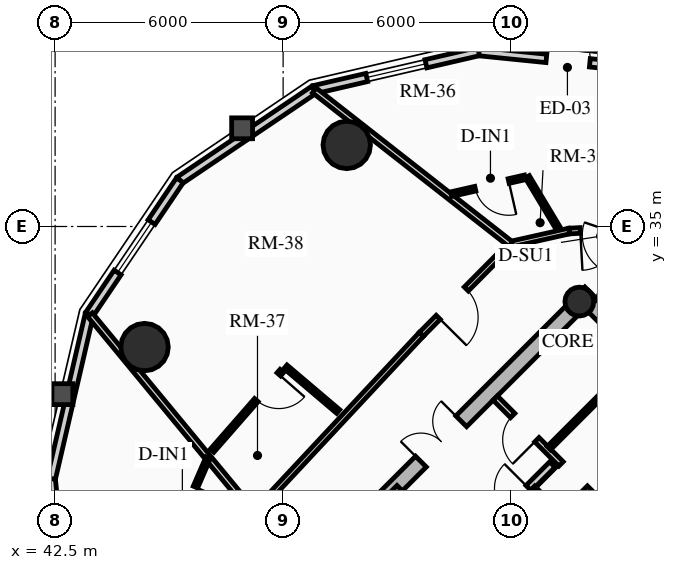
"""IFC4 building model, lengths in metres.
Left out: names, types, materials, properties, quantities, classifications, styles, units other than length and angle.
Written with IfcOpenShell. Run it as: python <this file> out.ifc"""

import sys

from ifc_helpers import new_model, si_unit, direction, frame, frame_2d, origin, origin_2d, place, context, subcontext, project, spatial, rectangle, circle, hollow_circle, extrude, source, transform, mapped, element, fill, save


model = new_model("IFC4")
c1 = context("Model", 3, precision=1e-05, world=origin(), true_north=direction((0.0, 1.0)))
c2 = subcontext(c1, "Body", "Model", "MODEL_VIEW")
j1 = project(units=[si_unit("LENGTHUNIT", "METRE"), si_unit("PLANEANGLEUNIT", "RADIAN")], contexts=[c1])
p1 = place(None, origin())
s1 = spatial("IfcSite", under=j1, at=p1, CompositionType="ELEMENT")
p2 = place(p1, origin())
s2 = spatial("IfcBuilding", under=s1, at=p2, CompositionType="ELEMENT")
p3 = place(p2, frame((0.0, 0.0, 180.7)))
s3 = spatial("IfcBuildingStorey", under=s2, at=p3, CompositionType="ELEMENT", Elevation=180.7)
p4 = place(p3, frame((66.268, 23.298, 0.0), z_axis=(0.0, 0.0, 1.0), x_axis=(-0.707106781187, 0.707106781187, 0.0)))
e1 = element("IfcWall", 1, at=p4, inside=s3, PredefinedType="SHEAR", context=c2, shape_type="SweptSolid", body=[
    extrude(rectangle(XDim=14.1, YDim=0.4, at=frame_2d((7.05, 0.0))), origin(), (0.0, 0.0, 1.0), 2.91),
])
p5 = place(p3, frame((48.873, 25.561, 0.0), z_axis=(0.0, 0.0, 1.0), x_axis=(0.707106781187, 0.707106781187, 0.0)))
e2 = element("IfcWall", 2, at=p5, inside=s3, PredefinedType="SHEAR", context=c2, shape_type="SweptSolid", body=[
    extrude(rectangle(XDim=10.7, YDim=0.4, at=frame_2d((5.35, 0.0))), origin(), (0.0, 0.0, 1.0), 2.91),
])
m1 = source(origin(), c2, "Body", "SweptSolid", [
    extrude(rectangle(XDim=1.5, YDim=2.02, at=frame_2d((0.75, 1.01))), frame((0.0, 0.21, 0.0), z_axis=(0.0, -1.0, 0.0), x_axis=(1.0, 0.0, 0.0)), (0.0, 0.0, 1.0), 0.42),
])
p6 = place(p5, frame((4.6, 0.0, 0.0)))
e3 = element("IfcOpeningElement", 3, at=p6, cuts=e2, PredefinedType="OPENING", context=c2, shape_type="MappedRepresentation", body=[
    mapped(m1, transform((0.0, 0.0, 0.0), x_axis=(1.0, 0.0, 0.0), y_axis=(0.0, 1.0, 0.0), z_axis=(0.0, 0.0, 1.0), scale=1.0)),
])
p7 = place(p3, frame((61.06, 18.373, 0.0), z_axis=(0.0, 0.0, 1.0), x_axis=(-0.707106781187, 0.707106781187, 0.0)))
e4 = element("IfcWall", 4, at=p7, inside=s3, PredefinedType="SHEAR", context=c2, shape_type="SweptSolid", body=[
    extrude(rectangle(XDim=13.7, YDim=0.35, at=frame_2d((6.85, 0.0))), origin(), (0.0, 0.0, 1.0), 2.91),
])
m2 = source(origin(), c2, "Body", "SweptSolid", [
    extrude(rectangle(XDim=1.1, YDim=2.015, at=frame_2d((0.55, 1.007))), frame((0.0, 0.185, 0.0), z_axis=(0.0, -1.0, 0.0), x_axis=(1.0, 0.0, 0.0)), (0.0, 0.0, 1.0), 0.37),
])
p8 = place(p7, frame((4.85, 0.0, 0.0)))
e5 = element("IfcOpeningElement", 5, at=p8, cuts=e4, PredefinedType="OPENING", context=c2, shape_type="MappedRepresentation", body=[
    mapped(m2, transform((0.0, 0.0, 0.0), x_axis=(1.0, 0.0, 0.0), y_axis=(0.0, 1.0, 0.0), z_axis=(0.0, 0.0, 1.0), scale=1.0)),
])
p9 = place(p7, frame((0.625, 0.0, 0.0)))
e6 = element("IfcOpeningElement", 6, at=p9, cuts=e4, PredefinedType="OPENING", context=c2, shape_type="MappedRepresentation", body=[
    mapped(m2, transform((0.0, 0.0, 0.0), x_axis=(1.0, 0.0, 0.0), y_axis=(0.0, 1.0, 0.0), z_axis=(0.0, 0.0, 1.0), scale=1.0)),
])
p10 = place(p7, frame((2.625, 0.0, 0.0)))
e7 = element("IfcOpeningElement", 7, at=p10, cuts=e4, PredefinedType="OPENING", context=c2, shape_type="MappedRepresentation", body=[
    mapped(m2, transform((0.0, 0.0, 0.0), x_axis=(1.0, 0.0, 0.0), y_axis=(0.0, 1.0, 0.0), z_axis=(0.0, 0.0, 1.0), scale=1.0)),
])
m3 = source(origin(), c2, "Body", "SweptSolid", [
    extrude(rectangle(XDim=1.15, YDim=2.02, at=frame_2d((0.575, 1.01))), frame((0.0, 0.185, 0.0), z_axis=(0.0, -1.0, 0.0), x_axis=(1.0, 0.0, 0.0)), (0.0, 0.0, 1.0), 0.37),
])
p11 = place(p7, frame((7.27, 0.0, 0.0)))
e8 = element("IfcOpeningElement", 8, at=p11, cuts=e4, PredefinedType="OPENING", context=c2, shape_type="MappedRepresentation", body=[
    mapped(m3, transform((0.0, 0.0, 0.0), x_axis=(1.0, 0.0, 0.0), y_axis=(0.0, 1.0, 0.0), z_axis=(0.0, 0.0, 1.0), scale=1.0)),
])
p12 = place(p3, frame((56.294, 33.024, 0.0), z_axis=(0.0, 0.0, 1.0), x_axis=(0.707106781187, 0.707106781187, 0.0)))
e9 = element("IfcColumn", 9, at=p12, inside=s3, PredefinedType="COLUMN", context=c2, shape_type="SweptSolid", body=[
    extrude(hollow_circle(Radius=0.38, WallThickness=0.032, at=origin_2d()), origin(), (0.0, 0.0, 1.0), 2.91),
])
for number, where, z_axis, x_axis in (
    (10, (50.173, 37.146, 0.0), (0.0, 0.0, 1.0), (1.0, 0.0, 0.0)),
    (11, (44.854, 31.827, 0.0), (0.0, 0.0, 1.0), (1.0, 0.0, 0.0)),
):
    element("IfcColumn", number, at=place(p3, frame(where, z_axis=z_axis, x_axis=x_axis)), inside=s3, PredefinedType="USERDEFINED", context=c2, shape_type="SweptSolid", body=[
        extrude(circle(Radius=0.625, at=origin_2d()), origin(), (0.0, 0.0, 1.0), 2.91),
    ])
p13 = place(p3, frame((53.645, 39.603, 0.0), z_axis=(0.0, 0.0, 1.0), x_axis=(0.994943283129, -0.100438356004, 0.0)))
e12 = element("IfcWall", 12, at=p13, inside=s3, PredefinedType="SOLIDWALL", context=c2, shape_type="SweptSolid", body=[
    extrude(rectangle(XDim=4.733, YDim=0.22, at=frame_2d((2.366, 0.0))), origin(), (0.0, 0.0, 1.0), 2.245),
])
m4 = source(origin(), c2, "Body", "SweptSolid", [
    extrude(rectangle(XDim=1.15, YDim=2.005, at=frame_2d((0.575, 1.002))), frame((0.0, 0.12, 0.0), z_axis=(0.0, -1.0, 0.0), x_axis=(1.0, 0.0, 0.0)), (0.0, 0.0, 1.0), 0.24),
])
p14 = place(p13, frame((1.791, 0.0, 0.0)))
e13 = element("IfcOpeningElement", 13, at=p14, cuts=e12, PredefinedType="OPENING", context=c2, shape_type="MappedRepresentation", body=[
    mapped(m4, transform((0.0, 0.0, 0.0), x_axis=(1.0, 0.0, 0.0), y_axis=(0.0, 1.0, 0.0), z_axis=(0.0, 0.0, 1.0), scale=1.0)),
])
p15 = place(p3, frame((49.313, 38.6, 0.0), z_axis=(0.0, 0.0, 1.0), x_axis=(0.97422620202, 0.22557328587, 0.0)))
e14 = element("IfcWall", 14, at=p15, inside=s3, PredefinedType="SOLIDWALL", context=c2, shape_type="SweptSolid", body=[
    extrude(rectangle(XDim=4.446, YDim=0.22, at=frame_2d((2.223, 0.0))), origin(), (0.0, 0.0, 1.0), 2.245),
])
m5 = source(origin(), c2, "Body", "SweptSolid", [
    extrude(rectangle(XDim=1.6, YDim=1.3, at=frame_2d((0.8, 0.65))), frame((0.0, 0.12, 0.0), z_axis=(0.0, -1.0, 0.0), x_axis=(1.0, 0.0, 0.0)), (0.0, 0.0, 1.0), 0.24),
])
p16 = place(p15, frame((1.423, 0.0, 0.65)))
e15 = element("IfcOpeningElement", 15, at=p16, cuts=e14, PredefinedType="OPENING", context=c2, shape_type="MappedRepresentation", body=[
    mapped(m5, transform((0.0, 0.0, 0.0), x_axis=(1.0, 0.0, 0.0), y_axis=(0.0, 1.0, 0.0), z_axis=(0.0, 0.0, 1.0), scale=1.0)),
])
p17 = place(p3, frame((45.783, 36.217, 0.0), z_axis=(0.0, 0.0, 1.0), x_axis=(0.828817439852, 0.55951912514, 0.0)))
e16 = element("IfcWall", 16, at=p17, inside=s3, PredefinedType="SOLIDWALL", context=c2, shape_type="SweptSolid", body=[
    extrude(rectangle(XDim=4.259, YDim=0.22, at=frame_2d((2.129, 0.0))), origin(), (0.0, 0.0, 1.0), 2.245),
])
p18 = place(p3, frame((43.4, 32.687, 0.0), z_axis=(0.0, 0.0, 1.0), x_axis=(0.55951912514, 0.828817439852, 0.0)))
e17 = element("IfcWall", 17, at=p18, inside=s3, PredefinedType="SOLIDWALL", context=c2, shape_type="SweptSolid", body=[
    extrude(rectangle(XDim=4.259, YDim=0.22, at=frame_2d((2.129, 0.0))), origin(), (0.0, 0.0, 1.0), 2.245),
])
p19 = place(p18, frame((1.33, 0.0, 0.65)))
e18 = element("IfcOpeningElement", 18, at=p19, cuts=e17, PredefinedType="OPENING", context=c2, shape_type="MappedRepresentation", body=[
    mapped(m5, transform((0.0, 0.0, 0.0), x_axis=(1.0, 0.0, 0.0), y_axis=(0.0, 1.0, 0.0), z_axis=(0.0, 0.0, 1.0), scale=1.0)),
])
p20 = place(p3, frame((42.397, 28.355, 0.0), z_axis=(0.0, 0.0, 1.0), x_axis=(0.22557328587, 0.97422620202, 0.0)))
e19 = element("IfcWall", 19, at=p20, inside=s3, PredefinedType="SOLIDWALL", context=c2, shape_type="SweptSolid", body=[
    extrude(rectangle(XDim=4.446, YDim=0.22, at=frame_2d((2.223, 0.0))), origin(), (0.0, 0.0, 1.0), 2.245),
])
p21 = place(p3, frame((42.873, 23.646, 0.0), z_axis=(0.0, 0.0, 1.0), x_axis=(-0.100438356004, 0.994943283129, 0.0)))
e20 = element("IfcWall", 20, at=p21, inside=s3, PredefinedType="SOLIDWALL", context=c2, shape_type="SweptSolid", body=[
    extrude(rectangle(XDim=4.733, YDim=0.22, at=frame_2d((2.366, 0.0))), origin(), (0.0, 0.0, 1.0), 2.245),
])
p22 = place(p21, frame((1.566, 0.0, 0.65)))
e21 = element("IfcOpeningElement", 21, at=p22, cuts=e20, PredefinedType="OPENING", context=c2, shape_type="MappedRepresentation", body=[
    mapped(m5, transform((0.0, 0.0, 0.0), x_axis=(1.0, 0.0, 0.0), y_axis=(0.0, 1.0, 0.0), z_axis=(0.0, 0.0, 1.0), scale=1.0)),
])
p23 = place(p3, frame((53.264, 26.416, 0.0), z_axis=(0.0, 0.0, 1.0), x_axis=(0.707106781187, 0.707106781187, 0.0)))
e22 = element("IfcWall", 22, at=p23, inside=s3, PredefinedType="PARTITIONING", context=c2, shape_type="SweptSolid", body=[
    extrude(rectangle(XDim=3.28, YDim=0.2, at=frame_2d((1.64, 0.0))), origin(), (0.0, 0.0, 1.0), 2.675),
])
m6 = source(origin(), c2, "Body", "SweptSolid", [
    extrude(rectangle(XDim=1.0, YDim=2.015, at=frame_2d((0.5, 1.007))), frame((0.0, 0.11, 0.0), z_axis=(0.0, -1.0, 0.0), x_axis=(1.0, 0.0, 0.0)), (0.0, 0.0, 1.0), 0.22),
])
p24 = place(p23, frame((0.14, 0.0, 0.0)))
e23 = element("IfcOpeningElement", 23, at=p24, cuts=e22, PredefinedType="OPENING", context=c2, shape_type="MappedRepresentation", body=[
    mapped(m6, transform((0.0, 0.0, 0.0), x_axis=(1.0, 0.0, 0.0), y_axis=(0.0, 1.0, 0.0), z_axis=(0.0, 0.0, 1.0), scale=1.0)),
])
m7 = source(origin(), c2, "Body", "SweptSolid", [
    extrude(rectangle(XDim=0.9, YDim=2.005, at=frame_2d((0.45, 1.002))), frame((0.0, 0.11, 0.0), z_axis=(0.0, -1.0, 0.0), x_axis=(1.0, 0.0, 0.0)), (0.0, 0.0, 1.0), 0.22),
])
p25 = place(p23, frame((1.5, 0.0, 0.0)))
e24 = element("IfcOpeningElement", 24, at=p25, cuts=e22, PredefinedType="OPENING", context=c2, shape_type="MappedRepresentation", body=[
    mapped(m7, transform((0.0, 0.0, 0.0), x_axis=(1.0, 0.0, 0.0), y_axis=(0.0, 1.0, 0.0), z_axis=(0.0, 0.0, 1.0), scale=1.0)),
])
p26 = place(p3, frame((56.673, 26.529, 0.0), z_axis=(0.0, 0.0, 1.0), x_axis=(-0.707052764397, 0.70716079385, 0.0)))
e25 = element("IfcWall", 25, at=p26, inside=s3, PredefinedType="PARTITIONING", context=c2, shape_type="SweptSolid", body=[
    extrude(rectangle(XDim=2.26, YDim=0.125, at=frame_2d((1.13, 0.0))), origin(), (0.0, 0.0, 1.0), 2.675),
])
m8 = source(origin(), c2, "Body", "SweptSolid", [
    extrude(rectangle(XDim=0.9, YDim=2.005, at=frame_2d((0.45, 1.002))), frame((0.0, 0.073, 0.0), z_axis=(0.0, -1.0, 0.0), x_axis=(1.0, 0.0, 0.0)), (0.0, 0.0, 1.0), 0.145),
])
p27 = place(p26, frame((0.65, 0.0, 0.0)))
e26 = element("IfcOpeningElement", 26, at=p27, cuts=e25, PredefinedType="OPENING", context=c2, shape_type="MappedRepresentation", body=[
    mapped(m8, transform((0.0, 0.0, 0.0), x_axis=(1.0, 0.0, 0.0), y_axis=(0.0, 1.0, 0.0), z_axis=(0.0, 0.0, 1.0), scale=1.0)),
])
p28 = place(p3, frame((56.839, 27.728, 0.0), z_axis=(0.0, 0.0, 1.0), x_axis=(-0.707106781187, 0.707106781187, 0.0)))
e27 = element("IfcWall", 27, at=p28, inside=s3, PredefinedType="PARTITIONING", context=c2, shape_type="SweptSolid", body=[
    extrude(rectangle(XDim=3.9, YDim=0.16, at=frame_2d((1.95, 0.0))), origin(), (0.0, 0.0, 1.0), 2.675),
])
m9 = source(origin(), c2, "Body", "SweptSolid", [
    extrude(rectangle(XDim=0.9, YDim=2.005, at=frame_2d((0.45, 1.002))), frame((0.0, 0.09, 0.0), z_axis=(0.0, -1.0, 0.0), x_axis=(1.0, 0.0, 0.0)), (0.0, 0.0, 1.0), 0.18),
])
p29 = place(p28, frame((0.55, 0.0, 0.0)))
e28 = element("IfcOpeningElement", 28, at=p29, cuts=e27, PredefinedType="OPENING", context=c2, shape_type="MappedRepresentation", body=[
    mapped(m9, transform((0.0, 0.0, 0.0), x_axis=(1.0, 0.0, 0.0), y_axis=(0.0, 1.0, 0.0), z_axis=(0.0, 0.0, 1.0), scale=1.0)),
])
p30 = place(p28, frame((2.35, 0.0, 0.0)))
e29 = element("IfcOpeningElement", 29, at=p30, cuts=e27, PredefinedType="OPENING", context=c2, shape_type="MappedRepresentation", body=[
    mapped(m9, transform((0.0, 0.0, 0.0), x_axis=(1.0, 0.0, 0.0), y_axis=(0.0, 1.0, 0.0), z_axis=(0.0, 0.0, 1.0), scale=1.0)),
])
p31 = place(p3, frame((55.492, 29.167, 0.0), z_axis=(0.0, 0.0, 1.0), x_axis=(0.707144688645, 0.707068871696, 0.0)))
e30 = element("IfcWall", 30, at=p31, inside=s3, PredefinedType="PARTITIONING", context=c2, shape_type="SweptSolid", body=[
    extrude(rectangle(XDim=3.22, YDim=0.125, at=frame_2d((1.61, 0.0))), origin(), (0.0, 0.0, 1.0), 2.212),
])
p32 = place(p3, frame((57.486, 34.96, 0.0), z_axis=(0.0, 0.0, 1.0), x_axis=(-0.998483871836, -0.055045051404, 0.0)))
e31 = element("IfcWall", 31, at=p32, inside=s3, PredefinedType="PARTITIONING", context=c2, shape_type="SweptSolid", body=[
    extrude(rectangle(XDim=1.464, YDim=0.15, at=frame_2d((0.732, 0.0))), origin(), (0.0, 0.0, 1.0), 2.245),
])
m10 = source(origin(), c2, "Body", "SweptSolid", [
    extrude(rectangle(XDim=1.05, YDim=2.015, at=frame_2d((0.525, 1.007))), frame((0.0, 0.085, 0.0), z_axis=(0.0, -1.0, 0.0), x_axis=(1.0, 0.0, 0.0)), (0.0, 0.0, 1.0), 0.17),
])
p33 = place(p32, frame((0.12, 0.0, 0.0)))
e32 = element("IfcOpeningElement", 32, at=p33, cuts=e31, PredefinedType="OPENING", context=c2, shape_type="MappedRepresentation", body=[
    mapped(m10, transform((0.0, 0.0, 0.0), x_axis=(1.0, 0.0, 0.0), y_axis=(0.0, 1.0, 0.0), z_axis=(0.0, 0.0, 1.0), scale=1.0)),
])
p34 = place(p3, frame((56.025, 34.88, 0.0), z_axis=(0.0, 0.0, 1.0), x_axis=(-0.975729093394, -0.218981132301, 0.0)))
e33 = element("IfcWall", 33, at=p34, inside=s3, PredefinedType="PARTITIONING", context=c2, shape_type="SweptSolid", body=[
    extrude(rectangle(XDim=1.575, YDim=0.15, at=frame_2d((0.788, 0.0))), origin(), (0.0, 0.0, 1.0), 2.245),
])
p35 = place(p3, frame((54.488, 34.535, 0.0), z_axis=(0.0, 0.0, 1.0), x_axis=(-0.703666289339, -0.710530613871, 0.0)))
e34 = element("IfcWall", 34, at=p35, inside=s3, PredefinedType="PARTITIONING", context=c2, shape_type="SweptSolid", body=[
    extrude(rectangle(XDim=3.343, YDim=0.15, at=frame_2d((1.672, 0.0))), origin(), (0.0, 0.0, 1.0), 2.245),
])
p36 = place(p35, frame((1.66, 0.0, 0.0)))
e35 = element("IfcOpeningElement", 35, at=p36, cuts=e34, PredefinedType="OPENING", context=c2, shape_type="MappedRepresentation", body=[
    mapped(m10, transform((0.0, 0.0, 0.0), x_axis=(1.0, 0.0, 0.0), y_axis=(0.0, 1.0, 0.0), z_axis=(0.0, 0.0, 1.0), scale=1.0)),
])
p37 = place(p3, frame((52.135, 32.159, 0.0), z_axis=(0.0, 0.0, 1.0), x_axis=(-0.682546302454, -0.730842353047, 0.0)))
e36 = element("IfcWall", 36, at=p37, inside=s3, PredefinedType="PARTITIONING", context=c2, shape_type="SweptSolid", body=[
    extrude(rectangle(XDim=6.445, YDim=0.15, at=frame_2d((3.223, 0.0))), origin(), (0.0, 0.0, 1.0), 2.245),
])
p38 = place(p3, frame((54.488, 34.535, 0.0), z_axis=(0.0, 0.0, 1.0), x_axis=(-0.787155500995, 0.616754584298, 0.0)))
e37 = element("IfcWall", 37, at=p38, inside=s3, PredefinedType="PARTITIONING", context=c2, shape_type="SweptSolid", body=[
    extrude(rectangle(XDim=6.562, YDim=0.16, at=frame_2d((3.281, 0.0))), origin(), (0.0, 0.0, 1.0), 2.245),
])
p39 = place(p3, frame((47.736, 27.449, 0.0), z_axis=(0.0, 0.0, 1.0), x_axis=(-0.636785609289, 0.771040911886, 0.0)))
e38 = element("IfcWall", 38, at=p39, inside=s3, PredefinedType="PARTITIONING", context=c2, shape_type="SweptSolid", body=[
    extrude(rectangle(XDim=6.781, YDim=0.16, at=frame_2d((3.391, 0.0))), origin(), (0.0, 0.0, 1.0), 2.245),
])
p40 = place(p3, frame((55.727, 34.97, 0.0), z_axis=(0.0, 0.0, 1.0), x_axis=(-0.514518774568, 0.857479113808, 0.0)))
e39 = element("IfcWall", 39, at=p40, inside=s3, PredefinedType="PARTITIONING", context=c2, shape_type="SweptSolid", body=[
    extrude(rectangle(XDim=1.56, YDim=0.125, at=frame_2d((0.78, 0.0))), origin(), (0.0, 0.0, 1.0), 2.245),
])
p41 = place(p3, frame((54.864, 36.293, 0.0), z_axis=(0.0, 0.0, 1.0), x_axis=(-0.974875983782, -0.222748324896, 0.0)))
e40 = element("IfcWall", 40, at=p41, inside=s3, PredefinedType="PARTITIONING", context=c2, shape_type="SweptSolid", body=[
    extrude(rectangle(XDim=1.994, YDim=0.125, at=frame_2d((0.997, 0.0))), origin(), (0.0, 0.0, 1.0), 2.675),
])
p42 = place(p41, frame((0.44, 0.0, 0.0)))
e41 = element("IfcOpeningElement", 41, at=p42, cuts=e40, PredefinedType="OPENING", context=c2, shape_type="MappedRepresentation", body=[
    mapped(m8, transform((0.0, 0.0, 0.0), x_axis=(1.0, 0.0, 0.0), y_axis=(0.0, 1.0, 0.0), z_axis=(0.0, 0.0, 1.0), scale=1.0)),
])
p43 = place(p3, frame((49.949, 30.13, 0.0), z_axis=(0.0, 0.0, 1.0), x_axis=(-0.76253118385, 0.646951461592, 0.0)))
e42 = element("IfcWall", 42, at=p43, inside=s3, PredefinedType="PARTITIONING", context=c2, shape_type="SweptSolid", body=[
    extrude(rectangle(XDim=1.821, YDim=0.125, at=frame_2d((0.91, 0.0))), origin(), (0.0, 0.0, 1.0), 2.675),
])
p44 = place(p3, frame((48.465, 31.199, 0.0), z_axis=(0.0, 0.0, 1.0), x_axis=(-0.658113718436, -0.752918543805, 0.0)))
e43 = element("IfcWall", 43, at=p44, inside=s3, PredefinedType="PARTITIONING", context=c2, shape_type="SweptSolid", body=[
    extrude(rectangle(XDim=2.786, YDim=0.125, at=frame_2d((1.393, 0.0))), origin(), (0.0, 0.0, 1.0), 2.245),
])
p45 = place(p44, frame((0.12, 0.0, 0.0)))
e44 = element("IfcOpeningElement", 44, at=p45, cuts=e43, PredefinedType="OPENING", context=c2, shape_type="MappedRepresentation", body=[
    mapped(m8, transform((0.0, 0.0, 0.0), x_axis=(1.0, 0.0, 0.0), y_axis=(0.0, 1.0, 0.0), z_axis=(0.0, 0.0, 1.0), scale=1.0)),
])
p46 = place(p3, frame((46.527, 28.913, 0.0), z_axis=(0.0, 0.0, 1.0), x_axis=(-0.398002989165, -0.917384118358, 0.0)))
e45 = element("IfcWall", 45, at=p46, inside=s3, PredefinedType="PARTITIONING", context=c2, shape_type="SweptSolid", body=[
    extrude(rectangle(XDim=2.581, YDim=0.125, at=frame_2d((1.29, 0.0))), origin(), (0.0, 0.0, 1.0), 2.245),
])
p47 = place(p46, frame((0.84, 0.0, 0.0)))
e46 = element("IfcOpeningElement", 46, at=p47, cuts=e45, PredefinedType="OPENING", context=c2, shape_type="MappedRepresentation", body=[
    mapped(m8, transform((0.0, 0.0, 0.0), x_axis=(1.0, 0.0, 0.0), y_axis=(0.0, 1.0, 0.0), z_axis=(0.0, 0.0, 1.0), scale=1.0)),
])
m11 = source(origin(), c2, "Body", "SweptSolid", [
    extrude(rectangle(XDim=1.15, YDim=2.005, at=frame_2d((0.575, 1.002))), frame((0.0, 0.025, 0.0), z_axis=(0.0, -1.0, 0.0), x_axis=(1.0, 0.0, 0.0)), (0.0, 0.0, 1.0), 0.05),
])
p48 = place(p14, origin())
e47 = element("IfcDoor", 47, at=p48, inside=s3, OperationType="SINGLE_SWING_LEFT", PredefinedType="DOOR", context=c2, shape_type="MappedRepresentation", body=[
    mapped(m11, transform((0.0, 0.0, 0.0), x_axis=(1.0, 0.0, 0.0), y_axis=(0.0, 1.0, 0.0), z_axis=(0.0, 0.0, 1.0), scale=1.0)),
])
fill(e13, e47)
m12 = source(origin(), c2, "Body", "SweptSolid", [
    extrude(rectangle(XDim=1.6, YDim=1.3, at=frame_2d((0.8, 0.65))), frame((0.0, 0.03, 0.0), z_axis=(0.0, -1.0, 0.0), x_axis=(1.0, 0.0, 0.0)), (0.0, 0.0, 1.0), 0.06),
])
p49 = place(p16, origin())
e48 = element("IfcWindow", 48, at=p49, inside=s3, PartitioningType="SINGLE_PANEL", PredefinedType="WINDOW", context=c2, shape_type="MappedRepresentation", body=[
    mapped(m12, transform((0.0, 0.0, 0.0), x_axis=(1.0, 0.0, 0.0), y_axis=(0.0, 1.0, 0.0), z_axis=(0.0, 0.0, 1.0), scale=1.0)),
])
fill(e15, e48)
p50 = place(p19, origin())
e49 = element("IfcWindow", 49, at=p50, inside=s3, PartitioningType="SINGLE_PANEL", PredefinedType="WINDOW", context=c2, shape_type="MappedRepresentation", body=[
    mapped(m12, transform((0.0, 0.0, 0.0), x_axis=(1.0, 0.0, 0.0), y_axis=(0.0, 1.0, 0.0), z_axis=(0.0, 0.0, 1.0), scale=1.0)),
])
fill(e18, e49)
m13 = source(origin(), c2, "Body", "SweptSolid", [
    extrude(rectangle(XDim=1.5, YDim=2.02, at=frame_2d((0.75, 1.01))), frame((0.0, 0.025, 0.0), z_axis=(0.0, -1.0, 0.0), x_axis=(1.0, 0.0, 0.0)), (0.0, 0.0, 1.0), 0.05),
])
p51 = place(p6, origin())
e50 = element("IfcDoor", 50, at=p51, inside=s3, OperationType="DOUBLE_DOOR_SINGLE_SWING", PredefinedType="DOOR", context=c2, shape_type="MappedRepresentation", body=[
    mapped(m13, transform((0.0, 0.0, 0.0), x_axis=(1.0, 0.0, 0.0), y_axis=(0.0, 1.0, 0.0), z_axis=(0.0, 0.0, 1.0), scale=1.0)),
])
fill(e3, e50)
m14 = source(origin(), c2, "Body", "SweptSolid", [
    extrude(rectangle(XDim=0.9, YDim=2.005, at=frame_2d((0.45, 1.002))), frame((0.0, 0.025, 0.0), z_axis=(0.0, -1.0, 0.0), x_axis=(1.0, 0.0, 0.0)), (0.0, 0.0, 1.0), 0.05),
])
p52 = place(p25, origin())
e51 = element("IfcDoor", 51, at=p52, inside=s3, OperationType="SINGLE_SWING_RIGHT", PredefinedType="DOOR", context=c2, shape_type="MappedRepresentation", body=[
    mapped(m14, transform((0.0, 0.0, 0.0), x_axis=(1.0, 0.0, 0.0), y_axis=(0.0, 1.0, 0.0), z_axis=(0.0, 0.0, 1.0), scale=1.0)),
])
fill(e24, e51)
p53 = place(p29, origin())
e52 = element("IfcDoor", 52, at=p53, inside=s3, OperationType="SINGLE_SWING_RIGHT", PredefinedType="DOOR", context=c2, shape_type="MappedRepresentation", body=[
    mapped(m14, transform((0.0, 0.0, 0.0), x_axis=(1.0, 0.0, 0.0), y_axis=(0.0, 1.0, 0.0), z_axis=(0.0, 0.0, 1.0), scale=1.0)),
])
fill(e28, e52)
p54 = place(p30, origin())
e53 = element("IfcDoor", 53, at=p54, inside=s3, OperationType="SINGLE_SWING_LEFT", PredefinedType="DOOR", context=c2, shape_type="MappedRepresentation", body=[
    mapped(m14, transform((0.0, 0.0, 0.0), x_axis=(1.0, 0.0, 0.0), y_axis=(0.0, 1.0, 0.0), z_axis=(0.0, 0.0, 1.0), scale=1.0)),
])
fill(e29, e53)
m15 = source(origin(), c2, "Body", "SweptSolid", [
    extrude(rectangle(XDim=1.05, YDim=2.015, at=frame_2d((0.525, 1.007))), frame((0.0, 0.025, 0.0), z_axis=(0.0, -1.0, 0.0), x_axis=(1.0, 0.0, 0.0)), (0.0, 0.0, 1.0), 0.05),
])
p55 = place(p33, origin())
e54 = element("IfcDoor", 54, at=p55, inside=s3, OperationType="SINGLE_SWING_RIGHT", PredefinedType="DOOR", context=c2, shape_type="MappedRepresentation", body=[
    mapped(m15, transform((0.0, 0.0, 0.0), x_axis=(1.0, 0.0, 0.0), y_axis=(0.0, 1.0, 0.0), z_axis=(0.0, 0.0, 1.0), scale=1.0)),
])
fill(e32, e54)
p56 = place(p42, origin())
e55 = element("IfcDoor", 55, at=p56, inside=s3, OperationType="SINGLE_SWING_LEFT", PredefinedType="DOOR", context=c2, shape_type="MappedRepresentation", body=[
    mapped(m14, transform((0.0, 0.0, 0.0), x_axis=(1.0, 0.0, 0.0), y_axis=(0.0, 1.0, 0.0), z_axis=(0.0, 0.0, 1.0), scale=1.0)),
])
fill(e41, e55)
p57 = place(p36, origin())
e56 = element("IfcDoor", 56, at=p57, inside=s3, OperationType="SINGLE_SWING_RIGHT", PredefinedType="DOOR", context=c2, shape_type="MappedRepresentation", body=[
    mapped(m15, transform((0.0, 0.0, 0.0), x_axis=(1.0, 0.0, 0.0), y_axis=(0.0, 1.0, 0.0), z_axis=(0.0, 0.0, 1.0), scale=1.0)),
])
fill(e35, e56)
p58 = place(p45, origin())
e57 = element("IfcDoor", 57, at=p58, inside=s3, OperationType="SINGLE_SWING_LEFT", PredefinedType="DOOR", context=c2, shape_type="MappedRepresentation", body=[
    mapped(m14, transform((0.0, 0.0, 0.0), x_axis=(1.0, 0.0, 0.0), y_axis=(0.0, 1.0, 0.0), z_axis=(0.0, 0.0, 1.0), scale=1.0)),
])
fill(e44, e57)
p59 = place(p47, origin())
e58 = element("IfcDoor", 58, at=p59, inside=s3, OperationType="SINGLE_SWING_LEFT", PredefinedType="DOOR", context=c2, shape_type="MappedRepresentation", body=[
    mapped(m14, transform((0.0, 0.0, 0.0), x_axis=(1.0, 0.0, 0.0), y_axis=(0.0, 1.0, 0.0), z_axis=(0.0, 0.0, 1.0), scale=1.0)),
])
fill(e46, e58)
save(model, sys.argv[1])
